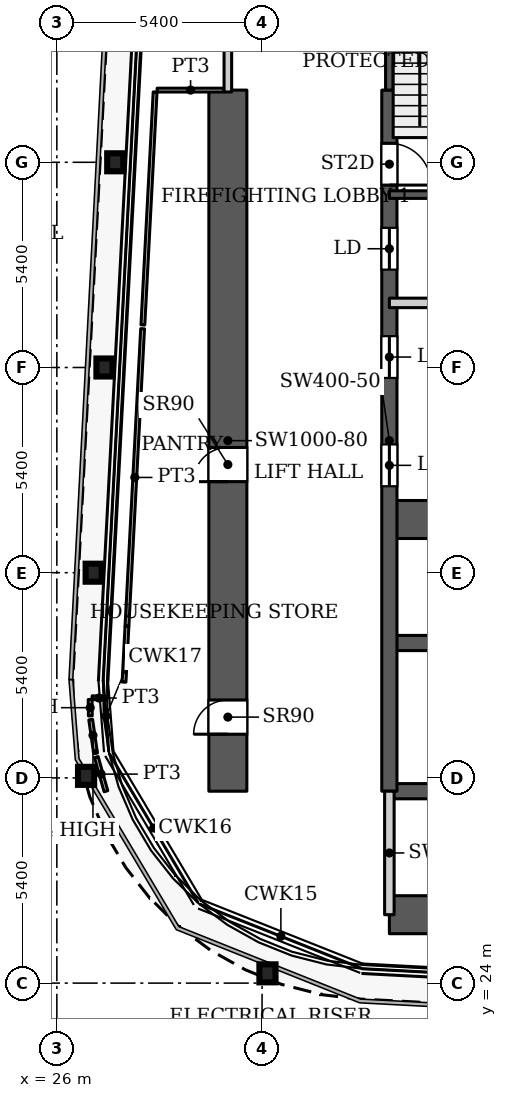
"""IFC4 building model, lengths in metres.
Left out: names, types, materials, properties, quantities, classifications, styles, units other than length and angle.
Written with IfcOpenShell. Run it as: python <this file> out.ifc"""

import sys

from ifc_helpers import new_model, si_unit, direction, frame, frame_2d, origin, origin_2d, place, context, subcontext, project, spatial, rectangle, i_section, extrude, source, transform, mapped, element, fill, save


model = new_model("IFC4")
c1 = context("Model", 3, precision=1e-05, world=origin(), true_north=direction((0.0, 1.0)))
c2 = subcontext(c1, "Body", "Model", "MODEL_VIEW")
j1 = project(units=[si_unit("LENGTHUNIT", "METRE"), si_unit("PLANEANGLEUNIT", "RADIAN")], contexts=[c1])
p1 = place(None, origin())
s1 = spatial("IfcSite", under=j1, at=p1, CompositionType="ELEMENT")
p2 = place(p1, origin())
s2 = spatial("IfcBuilding", under=s1, at=p2, CompositionType="ELEMENT")
p3 = place(p2, frame((0.0, 0.0, 81.2)))
s3 = spatial("IfcBuildingStorey", under=s2, at=p3, CompositionType="ELEMENT", Elevation=81.2)
for number, where, z_axis, x_axis in (
    (1, (31.542, 24.257, 0.0), (0.0, 0.0, 1.0), (1.0, 0.0, 0.0)),
    (2, (26.769, 29.454, 0.0), (0.0, 0.0, 1.0), (1.0, 0.0, 0.0)),
    (3, (26.969, 34.8, 0.0), (0.0, 0.0, 1.0), (1.0, 0.0, 0.0)),
    (4, (27.253, 40.2, 0.0), (0.0, 0.0, 1.0), (1.0, 0.0, 0.0)),
    (5, (27.537, 45.6, 0.0), (0.0, 0.0, 1.0), (1.0, 0.0, 0.0)),
):
    element("IfcColumn", number, at=place(p3, frame(where, z_axis=z_axis, x_axis=x_axis)), inside=s3, PredefinedType="COLUMN", context=c2, shape_type="SweptSolid", body=[
        extrude(i_section(OverallWidth=0.424, OverallDepth=0.474, WebThickness=0.048, FlangeThickness=0.077, FilletRadius=0.014, at=origin_2d()), origin(), (0.0, 0.0, 1.0), 7.8),
    ])
p4 = place(p3, frame((34.75, 25.8, 0.0), z_axis=(0.0, 0.0, 1.0), x_axis=(1.0, 0.0, 0.0)))
e6 = element("IfcWall", 6, at=p4, inside=s3, PredefinedType="SHEAR", context=c2, shape_type="SweptSolid", body=[
    extrude(rectangle(XDim=18.4, YDim=1.0, at=frame_2d((9.2, 0.0))), origin(), (0.0, 0.0, 1.0), 7.8),
])
p5 = place(p3, frame((34.75, 29.05, 0.0), z_axis=(0.0, 0.0, 1.0), x_axis=(1.0, 0.0, 0.0)))
e7 = element("IfcWall", 7, at=p5, inside=s3, PredefinedType="SHEAR", context=c2, shape_type="SweptSolid", body=[
    extrude(rectangle(XDim=18.4, YDim=0.4, at=frame_2d((9.2, 0.0))), origin(), (0.0, 0.0, 1.0), 7.8),
])
p6 = place(p5, frame((15.125, 0.0, 0.0)))
e8 = element("IfcOpeningElement", 8, at=p6, cuts=e7, PredefinedType="OPENING", context=c2, shape_type="SweptSolid", body=[
    extrude(rectangle(XDim=1.1, YDim=2.2, at=frame_2d((0.55, 1.1))), frame((0.0, 0.21, 0.0), z_axis=(0.0, -1.0, 0.0), x_axis=(1.0, 0.0, 0.0)), (0.0, 0.0, 1.0), 0.42),
])
p7 = place(p3, frame((34.75, 32.95, 0.0), z_axis=(0.0, 0.0, 1.0), x_axis=(1.0, 0.0, 0.0)))
e9 = element("IfcWall", 9, at=p7, inside=s3, PredefinedType="SHEAR", context=c2, shape_type="SweptSolid", body=[
    extrude(rectangle(XDim=14.25, YDim=0.4, at=frame_2d((7.125, 0.0))), origin(), (0.0, 0.0, 1.0), 7.8),
])
p8 = place(p3, frame((34.75, 36.2, 0.0), z_axis=(0.0, 0.0, 1.0), x_axis=(1.0, 0.0, 0.0)))
e10 = element("IfcWall", 10, at=p8, inside=s3, PredefinedType="SHEAR", context=c2, shape_type="SweptSolid", body=[
    extrude(rectangle(XDim=18.4, YDim=1.0, at=frame_2d((9.2, 0.0))), origin(), (0.0, 0.0, 1.0), 7.8),
])
p9 = place(p8, frame((16.9, 0.0, 0.0)))
e11 = element("IfcOpeningElement", 11, at=p9, cuts=e10, PredefinedType="OPENING", context=c2, shape_type="SweptSolid", body=[
    extrude(rectangle(XDim=1.0, YDim=2.2, at=frame_2d((0.5, 1.1))), frame((0.0, 0.51, 0.0), z_axis=(0.0, -1.0, 0.0), x_axis=(1.0, 0.0, 0.0)), (0.0, 0.0, 1.0), 1.02),
])
p10 = place(p3, frame((34.75, 29.05, 0.0), z_axis=(0.0, 0.0, 1.0), x_axis=(0.0, 1.0, 0.0)))
e12 = element("IfcWall", 12, at=p10, inside=s3, PredefinedType="SHEAR", context=c2, shape_type="SweptSolid", body=[
    extrude(rectangle(XDim=18.45, YDim=0.4, at=frame_2d((9.225, 0.0))), origin(), (0.0, 0.0, 1.0), 7.8),
])
p11 = place(p10, frame((8.025, 0.0, 0.0)))
e13 = element("IfcOpeningElement", 13, at=p11, cuts=e12, PredefinedType="OPENING", context=c2, shape_type="SweptSolid", body=[
    extrude(rectangle(XDim=1.1, YDim=2.2, at=frame_2d((0.55, 1.1))), frame((0.0, 0.21, 0.0), z_axis=(0.0, -1.0, 0.0), x_axis=(1.0, 0.0, 0.0)), (0.0, 0.0, 1.0), 0.42),
])
p12 = place(p10, frame((10.875, 0.0, 0.0)))
e14 = element("IfcOpeningElement", 14, at=p12, cuts=e12, PredefinedType="OPENING", context=c2, shape_type="SweptSolid", body=[
    extrude(rectangle(XDim=1.1, YDim=2.2, at=frame_2d((0.55, 1.1))), frame((0.0, 0.21, 0.0), z_axis=(0.0, -1.0, 0.0), x_axis=(1.0, 0.0, 0.0)), (0.0, 0.0, 1.0), 0.42),
])
p13 = place(p10, frame((13.725, 0.0, 0.0)))
e15 = element("IfcOpeningElement", 15, at=p13, cuts=e12, PredefinedType="OPENING", context=c2, shape_type="SweptSolid", body=[
    extrude(rectangle(XDim=1.1, YDim=2.2, at=frame_2d((0.55, 1.1))), frame((0.0, 0.21, 0.0), z_axis=(0.0, -1.0, 0.0), x_axis=(1.0, 0.0, 0.0)), (0.0, 0.0, 1.0), 0.42),
])
p14 = place(p10, frame((15.95, 0.0, 0.0)))
e16 = element("IfcOpeningElement", 16, at=p14, cuts=e12, PredefinedType="OPENING", context=c2, shape_type="SweptSolid", body=[
    extrude(rectangle(XDim=1.1, YDim=2.2, at=frame_2d((0.55, 1.1))), frame((0.0, 0.21, 0.0), z_axis=(0.0, -1.0, 0.0), x_axis=(1.0, 0.0, 0.0)), (0.0, 0.0, 1.0), 0.42),
])
p15 = place(p3, frame((30.5, 29.05, 0.0), z_axis=(0.0, 0.0, 1.0), x_axis=(0.0, 1.0, 0.0)))
e17 = element("IfcWall", 17, at=p15, inside=s3, PredefinedType="SHEAR", context=c2, shape_type="SweptSolid", body=[
    extrude(rectangle(XDim=18.45, YDim=1.0, at=frame_2d((9.225, 0.0))), origin(), (0.0, 0.0, 1.0), 7.8),
])
p16 = place(p15, frame((1.5, 0.0, 0.0)))
e18 = element("IfcOpeningElement", 18, at=p16, cuts=e17, PredefinedType="OPENING", context=c2, shape_type="SweptSolid", body=[
    extrude(rectangle(XDim=0.9, YDim=2.2, at=frame_2d((0.45, 1.1))), frame((0.0, 0.51, 0.0), z_axis=(0.0, -1.0, 0.0), x_axis=(1.0, 0.0, 0.0)), (0.0, 0.0, 1.0), 1.02),
])
p17 = place(p15, frame((8.146, 0.0, 0.0)))
e19 = element("IfcOpeningElement", 19, at=p17, cuts=e17, PredefinedType="OPENING", context=c2, shape_type="SweptSolid", body=[
    extrude(rectangle(XDim=0.9, YDim=2.2, at=frame_2d((0.45, 1.1))), frame((0.0, 0.51, 0.0), z_axis=(0.0, -1.0, 0.0), x_axis=(1.0, 0.0, 0.0)), (0.0, 0.0, 1.0), 1.02),
])
p18 = place(p3, frame((34.75, 44.75, 0.0), z_axis=(0.0, 0.0, 1.0), x_axis=(1.0, 0.0, 0.0)))
e20 = element("IfcWall", 20, at=p18, inside=s3, PredefinedType="SHEAR", context=c2, shape_type="SweptSolid", body=[
    extrude(rectangle(XDim=3.15, YDim=0.2, at=frame_2d((1.575, 0.0))), origin(), (0.0, 0.0, 1.0), 7.8),
])
p19 = place(p3, frame((34.75, 47.5, 0.0), z_axis=(0.0, 0.0, 1.0), x_axis=(0.0, 1.0, 0.0)))
e21 = element("IfcWall", 21, at=p19, inside=s3, PredefinedType="SHEAR", context=c2, shape_type="SweptSolid", body=[
    extrude(rectangle(XDim=6.41, YDim=0.2, at=frame_2d((3.205, 0.0))), origin(), (0.0, 0.0, 1.0), 7.8),
])
for number, where, z_axis, x_axis in (
    (22, (34.75, 25.8, 0.0), (0.0, 0.0, 1.0), (0.0, 1.0, 0.0)),
    (23, (34.75, 41.9, 0.0), (0.0, 0.0, 1.0), (1.0, 0.0, 0.0)),
):
    element("IfcWall", number, at=place(p3, frame(where, z_axis=z_axis, x_axis=x_axis)), inside=s3, PredefinedType="PARTITIONING", context=c2, shape_type="SweptSolid", body=[
        extrude(rectangle(XDim=3.25, YDim=0.25, at=frame_2d((1.625, 0.0))), origin(), (0.0, 0.0, 1.0), 7.8),
    ])
p20 = place(p3, frame((26.876, 31.464, 0.0), z_axis=(0.0, 0.0, 1.0), x_axis=(0.011863571826, -0.999929625355, 0.0)))
e24 = element("IfcWall", 24, at=p20, inside=s3, PredefinedType="PARTITIONING", context=c2, shape_type="SweptSolid", body=[
    extrude(rectangle(XDim=0.432, YDim=0.1, at=frame_2d((0.216, 0.0))), origin(), (0.0, 0.0, 1.0), 7.034),
])
p21 = place(p3, frame((26.891, 30.933, 0.0), z_axis=(0.0, 0.0, 1.0), x_axis=(0.142654059435, -0.989772609909, 0.0)))
e25 = element("IfcWall", 25, at=p21, inside=s3, PredefinedType="PARTITIONING", context=c2, shape_type="SweptSolid", body=[
    extrude(rectangle(XDim=0.832, YDim=0.1, at=frame_2d((0.416, 0.0))), origin(), (0.0, 0.0, 1.0), 7.034),
])
p22 = place(p3, frame((27.01, 30.11, 0.0), z_axis=(0.0, 0.0, 1.0), x_axis=(0.143536305261, -0.989645052063, 0.0)))
e26 = element("IfcWall", 26, at=p22, inside=s3, PredefinedType="PARTITIONING", context=c2, shape_type="SweptSolid", body=[
    extrude(rectangle(XDim=0.065, YDim=0.1, at=frame_2d((0.032, 0.0))), origin(), (0.0, 0.0, 1.0), 7.5),
])
p23 = place(p3, frame((26.927, 31.511, 0.0), z_axis=(0.0, 0.0, 1.0), x_axis=(0.998783709616, -0.049306200475, 0.0)))
e27 = element("IfcWall", 27, at=p23, inside=s3, PredefinedType="PARTITIONING", context=c2, shape_type="SweptSolid", body=[
    extrude(rectangle(XDim=0.366, YDim=0.1, at=frame_2d((0.183, 0.0))), origin(), (0.0, 0.0, 1.0), 7.5),
])
p24 = place(p3, frame((27.039, 29.949, 0.0), z_axis=(0.0, 0.0, 1.0), x_axis=(0.270851570755, -0.96262112309, 0.0)))
e28 = element("IfcWall", 28, at=p24, inside=s3, PredefinedType="PARTITIONING", context=c2, shape_type="SweptSolid", body=[
    extrude(rectangle(XDim=0.934, YDim=0.1, at=frame_2d((0.467, 0.0))), origin(), (0.0, 0.0, 1.0), 7.5),
])
p25 = place(p3, frame((27.768, 31.921, 0.0), z_axis=(0.0, 0.0, 1.0), x_axis=(0.052167674468, 0.998638339811, 0.0)))
e29 = element("IfcWall", 29, at=p25, inside=s3, PredefinedType="PARTITIONING", context=c2, shape_type="SweptSolid", body=[
    extrude(rectangle(XDim=1.474, YDim=0.1, at=frame_2d((0.737, 0.0))), origin(), (0.0, 0.0, 1.0), 7.5),
])
p26 = place(p3, frame((27.845, 33.393, 0.0), z_axis=(0.0, 0.0, 1.0), x_axis=(0.052580086943, 0.998616710484, 0.0)))
e30 = element("IfcWall", 30, at=p26, inside=s3, PredefinedType="PARTITIONING", context=c2, shape_type="SweptSolid", body=[
    extrude(rectangle(XDim=7.838, YDim=0.1, at=frame_2d((3.919, 0.0))), origin(), (0.0, 0.0, 1.0), 7.5),
])
p27 = place(p3, frame((28.264, 41.32, 0.0), z_axis=(0.0, 0.0, 1.0), x_axis=(0.052460718565, 0.998622988423, 0.0)))
e31 = element("IfcWall", 31, at=p27, inside=s3, PredefinedType="PARTITIONING", context=c2, shape_type="SweptSolid", body=[
    extrude(rectangle(XDim=6.138, YDim=0.1, at=frame_2d((3.069, 0.0))), origin(), (0.0, 0.0, 1.0), 7.5),
])
p28 = place(p3, frame((28.638, 47.5, 0.0), z_axis=(0.0, 0.0, 1.0), x_axis=(1.0, 0.0, 0.0)))
e32 = element("IfcWall", 32, at=p28, inside=s3, PredefinedType="PARTITIONING", context=c2, shape_type="SweptSolid", body=[
    extrude(rectangle(XDim=1.762, YDim=0.1, at=frame_2d((0.881, 0.0))), origin(), (0.0, 0.0, 1.0), 7.5),
])
p29 = place(p3, frame((30.5, 47.45, 0.0), z_axis=(0.0, 0.0, 1.0), x_axis=(0.0, 1.0, 0.0)))
e33 = element("IfcWall", 33, at=p29, inside=s3, PredefinedType="PARTITIONING", context=c2, shape_type="SweptSolid", body=[
    extrude(rectangle(XDim=6.976, YDim=0.2, at=frame_2d((3.488, 0.0))), origin(), (0.0, 0.0, 1.0), 7.5),
])
p30 = place(p29, frame((2.65, 0.0, 0.0)))
e34 = element("IfcOpeningElement", 34, at=p30, cuts=e33, PredefinedType="OPENING", context=c2, shape_type="SweptSolid", body=[
    extrude(rectangle(XDim=1.8, YDim=2.1, at=frame_2d((0.9, 1.05))), frame((0.0, 0.11, 0.0), z_axis=(0.0, -1.0, 0.0), x_axis=(1.0, 0.0, 0.0)), (0.0, 0.0, 1.0), 0.22),
])
m1 = source(origin(), c2, "Body", "SweptSolid", [
    extrude(rectangle(XDim=1.1, YDim=2.2, at=frame_2d((0.55, 1.1))), frame((0.0, 0.025, 0.0), z_axis=(0.0, -1.0, 0.0), x_axis=(1.0, 0.0, 0.0)), (0.0, 0.0, 1.0), 0.05),
])
p31 = place(p11, origin())
e35 = element("IfcDoor", 35, at=p31, inside=s3, OperationType="SLIDING_TO_LEFT", PredefinedType="DOOR", context=c2, shape_type="MappedRepresentation", body=[
    mapped(m1, transform((0.0, 0.0, 0.0), x_axis=(1.0, 0.0, 0.0), y_axis=(0.0, 1.0, 0.0), z_axis=(0.0, 0.0, 1.0), scale=1.0)),
])
fill(e13, e35)
p32 = place(p12, origin())
e36 = element("IfcDoor", 36, at=p32, inside=s3, OperationType="SLIDING_TO_LEFT", PredefinedType="DOOR", context=c2, shape_type="MappedRepresentation", body=[
    mapped(m1, transform((0.0, 0.0, 0.0), x_axis=(1.0, 0.0, 0.0), y_axis=(0.0, 1.0, 0.0), z_axis=(0.0, 0.0, 1.0), scale=1.0)),
])
fill(e14, e36)
p33 = place(p13, origin())
e37 = element("IfcDoor", 37, at=p33, inside=s3, OperationType="SLIDING_TO_LEFT", PredefinedType="DOOR", context=c2, shape_type="MappedRepresentation", body=[
    mapped(m1, transform((0.0, 0.0, 0.0), x_axis=(1.0, 0.0, 0.0), y_axis=(0.0, 1.0, 0.0), z_axis=(0.0, 0.0, 1.0), scale=1.0)),
])
fill(e15, e37)
m2 = source(origin(), c2, "Body", "SweptSolid", [
    extrude(rectangle(XDim=0.9, YDim=2.2, at=frame_2d((0.45, 1.1))), frame((0.0, 0.025, 0.0), z_axis=(0.0, -1.0, 0.0), x_axis=(1.0, 0.0, 0.0)), (0.0, 0.0, 1.0), 0.05),
])
p34 = place(p16, origin())
e38 = element("IfcDoor", 38, at=p34, inside=s3, OperationType="SINGLE_SWING_LEFT", PredefinedType="DOOR", context=c2, shape_type="MappedRepresentation", body=[
    mapped(m2, transform((0.0, 0.0, 0.0), x_axis=(1.0, 0.0, 0.0), y_axis=(0.0, 1.0, 0.0), z_axis=(0.0, 0.0, 1.0), scale=1.0)),
])
fill(e18, e38)
p35 = place(p17, origin())
e39 = element("IfcDoor", 39, at=p35, inside=s3, OperationType="SINGLE_SWING_LEFT", PredefinedType="DOOR", context=c2, shape_type="MappedRepresentation", body=[
    mapped(m2, transform((0.0, 0.0, 0.0), x_axis=(1.0, 0.0, 0.0), y_axis=(0.0, 1.0, 0.0), z_axis=(0.0, 0.0, 1.0), scale=1.0)),
])
fill(e19, e39)
m3 = source(origin(), c2, "Body", "SweptSolid", [
    extrude(rectangle(XDim=1.1, YDim=2.2, at=frame_2d((0.55, 1.1))), frame((0.0, 0.025, 0.0), z_axis=(0.0, -1.0, 0.0), x_axis=(1.0, 0.0, 0.0)), (0.0, 0.0, 1.0), 0.05),
])
p36 = place(p14, origin())
e40 = element("IfcDoor", 40, at=p36, inside=s3, OperationType="SINGLE_SWING_RIGHT", PredefinedType="DOOR", context=c2, shape_type="MappedRepresentation", body=[
    mapped(m3, transform((0.0, 0.0, 0.0), x_axis=(1.0, 0.0, 0.0), y_axis=(0.0, 1.0, 0.0), z_axis=(0.0, 0.0, 1.0), scale=1.0)),
])
fill(e16, e40)
save(model, sys.argv[1])
